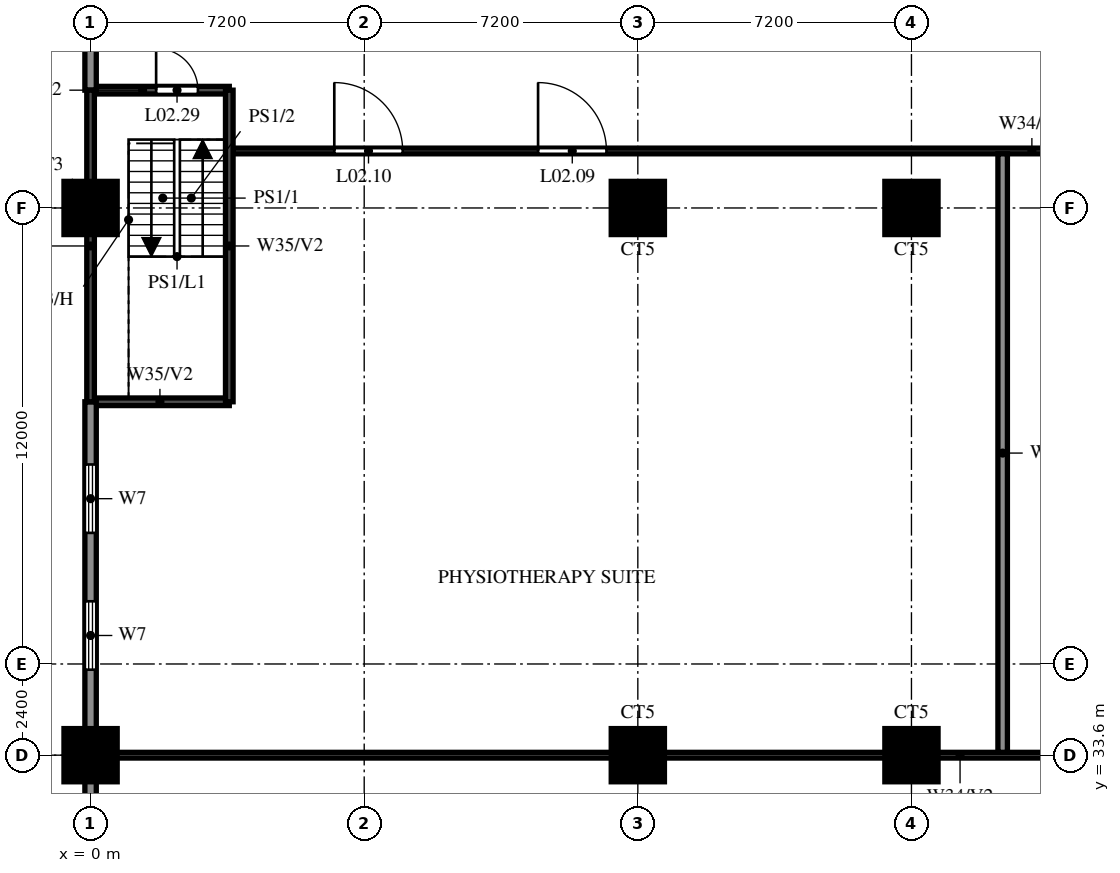
"""IFC4 building model, lengths in metres.
Left out: names, types, materials, properties, quantities, classifications, styles, units other than length and angle.
Written with IfcOpenShell. Run it as: python <this file> out.ifc"""

import sys

from ifc_helpers import new_model, si_unit, direction, frame, frame_2d, origin, origin_2d, place, context, subcontext, project, spatial, rectangle, circle, extrude, source, transform, mapped, element, fill, save


model = new_model("IFC4")
c1 = context("Model", 3, precision=1e-05, world=origin(), true_north=direction((0.0, 1.0)))
c2 = subcontext(c1, "Body", "Model", "MODEL_VIEW")
j1 = project(units=[si_unit("LENGTHUNIT", "METRE"), si_unit("PLANEANGLEUNIT", "RADIAN")], contexts=[c1])
p1 = place(None, origin())
s1 = spatial("IfcSite", under=j1, at=p1, CompositionType="ELEMENT")
p2 = place(p1, origin())
s2 = spatial("IfcBuilding", under=s1, at=p2, CompositionType="ELEMENT")
p3 = place(p2, frame((0.0, 0.0, 13.2)))
s3 = spatial("IfcBuildingStorey", under=s2, at=p3, CompositionType="ELEMENT", Elevation=13.2)
m1 = source(origin(), c2, "Body", "SweptSolid", [
    extrude(circle(Radius=0.7, at=origin_2d()), origin(), (0.0, 0.0, 1.0), 3.8),
])
for number, where, z_axis, x_axis in (
    (1, (0.0, 33.6, 0.0), (0.0, 0.0, 1.0), (1.0, 0.0, 0.0)),
    (2, (14.4, 33.6, 0.0), (0.0, 0.0, 1.0), (1.0, 0.0, 0.0)),
    (3, (21.6, 33.6, 0.0), (0.0, 0.0, 1.0), (1.0, 0.0, 0.0)),
    (4, (0.0, 48.0, 0.0), (0.0, 0.0, 1.0), (1.0, 0.0, 0.0)),
    (5, (14.4, 48.0, 0.0), (0.0, 0.0, 1.0), (1.0, 0.0, 0.0)),
    (6, (21.6, 48.0, 0.0), (0.0, 0.0, 1.0), (1.0, 0.0, 0.0)),
):
    element("IfcColumn", number, at=place(p3, frame(where, z_axis=z_axis, x_axis=x_axis)), inside=s3, PredefinedType="COLUMN", context=c2, shape_type="MappedRepresentation", body=[
        mapped(m1, transform((0.0, 0.0, 0.0))),
    ])
p4 = place(p3, frame((0.15, 33.6, 0.0), z_axis=(0.0, 0.0, 1.0), x_axis=(1.0, 0.0, 0.0)))
e7 = element("IfcWall", 7, at=p4, inside=s3, PredefinedType="PARTITIONING", context=c2, shape_type="SweptSolid", body=[
    extrude(rectangle(XDim=47.85, YDim=0.15, at=frame_2d((23.925, 0.0))), origin(), (0.0, 0.0, 1.0), 2.6),
])
p5 = place(p3, frame((0.0, 42.9, 0.0), z_axis=(0.0, 0.0, 1.0), x_axis=(1.0, 0.0, 0.0)))
e8 = element("IfcWall", 8, at=p5, inside=s3, PredefinedType="SOLIDWALL", context=c2, shape_type="SweptSolid", body=[
    extrude(rectangle(XDim=3.65, YDim=0.2, at=frame_2d((1.825, 0.0))), origin(), (0.0, 0.0, 1.0), 3.8),
])
p6 = place(p3, frame((3.75, 49.5, 0.0), z_axis=(0.0, 0.0, 1.0), x_axis=(1.0, 0.0, 0.0)))
e9 = element("IfcWall", 9, at=p6, inside=s3, PredefinedType="PARTITIONING", context=c2, shape_type="SweptSolid", body=[
    extrude(rectangle(XDim=44.25, YDim=0.15, at=frame_2d((22.125, 0.0))), origin(), (0.0, 0.0, 1.0), 2.6),
])
p7 = place(p6, frame((8.025, 0.0, 0.0)))
e10 = element("IfcOpeningElement", 10, at=p7, cuts=e9, PredefinedType="OPENING", context=c2, shape_type="SweptSolid", body=[
    extrude(rectangle(XDim=1.8, YDim=2.1, at=frame_2d((0.9, 1.05))), frame((0.0, 0.085, 0.0), z_axis=(0.0, -1.0, 0.0), x_axis=(1.0, 0.0, 0.0)), (0.0, 0.0, 1.0), 0.17),
])
p8 = place(p6, frame((2.663, 0.0, 0.0)))
e11 = element("IfcOpeningElement", 11, at=p8, cuts=e9, PredefinedType="OPENING", context=c2, shape_type="SweptSolid", body=[
    extrude(rectangle(XDim=1.8, YDim=2.1, at=frame_2d((0.9, 1.05))), frame((0.0, 0.085, 0.0), z_axis=(0.0, -1.0, 0.0), x_axis=(1.0, 0.0, 0.0)), (0.0, 0.0, 1.0), 0.17),
])
p9 = place(p6, frame((29.65, 0.0, 0.0)))
e12 = element("IfcOpeningElement", 12, at=p9, cuts=e9, PredefinedType="OPENING", context=c2, shape_type="SweptSolid", body=[
    extrude(rectangle(XDim=1.8, YDim=2.1, at=frame_2d((0.9, 1.05))), frame((0.0, 0.085, 0.0), z_axis=(0.0, -1.0, 0.0), x_axis=(1.0, 0.0, 0.0)), (0.0, 0.0, 1.0), 0.17),
])
p10 = place(p6, frame((22.42, 0.0, 0.0)))
e13 = element("IfcOpeningElement", 13, at=p10, cuts=e9, PredefinedType="OPENING", context=c2, shape_type="SweptSolid", body=[
    extrude(rectangle(XDim=1.8, YDim=2.1, at=frame_2d((0.9, 1.05))), frame((0.0, 0.085, 0.0), z_axis=(0.0, -1.0, 0.0), x_axis=(1.0, 0.0, 0.0)), (0.0, 0.0, 1.0), 0.17),
])
p11 = place(p3, frame((0.0, 51.1, 0.0), z_axis=(0.0, 0.0, 1.0), x_axis=(1.0, 0.0, 0.0)))
e14 = element("IfcWall", 14, at=p11, inside=s3, PredefinedType="SOLIDWALL", context=c2, shape_type="SweptSolid", body=[
    extrude(rectangle(XDim=3.65, YDim=0.2, at=frame_2d((1.825, 0.0))), origin(), (0.0, 0.0, 1.0), 3.8),
])
p12 = place(p11, frame((1.725, 0.0, 0.0)))
e15 = element("IfcOpeningElement", 15, at=p12, cuts=e14, PredefinedType="OPENING", context=c2, shape_type="SweptSolid", body=[
    extrude(rectangle(XDim=1.1, YDim=2.1, at=frame_2d((0.55, 1.05))), frame((0.0, 0.11, 0.0), z_axis=(0.0, -1.0, 0.0), x_axis=(1.0, 0.0, 0.0)), (0.0, 0.0, 1.0), 0.22),
])
p13 = place(p3, frame((0.0, 9.6, 0.0), z_axis=(0.0, 0.0, 1.0), x_axis=(0.0, 1.0, 0.0)))
e16 = element("IfcWall", 16, at=p13, inside=s3, PredefinedType="SOLIDWALL", context=c2, shape_type="SweptSolid", body=[
    extrude(rectangle(XDim=33.3, YDim=0.3, at=frame_2d((16.65, 0.0))), origin(), (0.0, 0.0, 1.0), 3.8),
])
p14 = place(p13, frame((1.05, 0.0, 0.6)))
e17 = element("IfcOpeningElement", 17, at=p14, cuts=e16, PredefinedType="OPENING", context=c2, shape_type="SweptSolid", body=[
    extrude(rectangle(XDim=1.8, YDim=2.4, at=frame_2d((0.9, 1.2))), frame((0.0, 0.16, 0.0), z_axis=(0.0, -1.0, 0.0), x_axis=(1.0, 0.0, 0.0)), (0.0, 0.0, 1.0), 0.32),
])
p15 = place(p13, frame((4.65, 0.0, 0.6)))
e18 = element("IfcOpeningElement", 18, at=p15, cuts=e16, PredefinedType="OPENING", context=c2, shape_type="SweptSolid", body=[
    extrude(rectangle(XDim=1.8, YDim=2.4, at=frame_2d((0.9, 1.2))), frame((0.0, 0.16, 0.0), z_axis=(0.0, -1.0, 0.0), x_axis=(1.0, 0.0, 0.0)), (0.0, 0.0, 1.0), 0.32),
])
p16 = place(p13, frame((11.85, 0.0, 0.6)))
e19 = element("IfcOpeningElement", 19, at=p16, cuts=e16, PredefinedType="OPENING", context=c2, shape_type="SweptSolid", body=[
    extrude(rectangle(XDim=1.8, YDim=2.4, at=frame_2d((0.9, 1.2))), frame((0.0, 0.16, 0.0), z_axis=(0.0, -1.0, 0.0), x_axis=(1.0, 0.0, 0.0)), (0.0, 0.0, 1.0), 0.32),
])
p17 = place(p13, frame((15.45, 0.0, 0.6)))
e20 = element("IfcOpeningElement", 20, at=p17, cuts=e16, PredefinedType="OPENING", context=c2, shape_type="SweptSolid", body=[
    extrude(rectangle(XDim=1.8, YDim=2.4, at=frame_2d((0.9, 1.2))), frame((0.0, 0.16, 0.0), z_axis=(0.0, -1.0, 0.0), x_axis=(1.0, 0.0, 0.0)), (0.0, 0.0, 1.0), 0.32),
])
p18 = place(p13, frame((26.25, 0.0, 0.6)))
e21 = element("IfcOpeningElement", 21, at=p18, cuts=e16, PredefinedType="OPENING", context=c2, shape_type="SweptSolid", body=[
    extrude(rectangle(XDim=1.8, YDim=2.4, at=frame_2d((0.9, 1.2))), frame((0.0, 0.16, 0.0), z_axis=(0.0, -1.0, 0.0), x_axis=(1.0, 0.0, 0.0)), (0.0, 0.0, 1.0), 0.32),
])
p19 = place(p13, frame((29.85, 0.0, 0.6)))
e22 = element("IfcOpeningElement", 22, at=p19, cuts=e16, PredefinedType="OPENING", context=c2, shape_type="SweptSolid", body=[
    extrude(rectangle(XDim=1.8, YDim=2.4, at=frame_2d((0.9, 1.2))), frame((0.0, 0.16, 0.0), z_axis=(0.0, -1.0, 0.0), x_axis=(1.0, 0.0, 0.0)), (0.0, 0.0, 1.0), 0.32),
])
p20 = place(p3, frame((0.0, 51.1, 0.0), z_axis=(0.0, 0.0, 1.0), x_axis=(0.0, 1.0, 0.0)))
e23 = element("IfcWall", 23, at=p20, inside=s3, PredefinedType="SOLIDWALL", context=c2, shape_type="SweptSolid", body=[
    extrude(rectangle(XDim=3.2, YDim=0.3, at=frame_2d((1.6, 0.0))), origin(), (0.0, 0.0, 1.0), 3.8),
])
for number, where, z_axis, x_axis in (
    (24, (0.0, 42.9, 0.0), (0.0, 0.0, 1.0), (0.0, 1.0, 0.0)),
    (25, (3.65, 42.9, 0.0), (0.0, 0.0, 1.0), (0.0, 1.0, 0.0)),
):
    element("IfcWall", number, at=place(p3, frame(where, z_axis=z_axis, x_axis=x_axis)), inside=s3, PredefinedType="SOLIDWALL", context=c2, shape_type="SweptSolid", body=[
        extrude(rectangle(XDim=8.2, YDim=0.2, at=frame_2d((4.1, 0.0))), origin(), (0.0, 0.0, 1.0), 3.8),
    ])
p21 = place(p3, frame((24.0, 33.675, 0.0), z_axis=(0.0, 0.0, 1.0), x_axis=(0.0, 1.0, 0.0)))
e26 = element("IfcWall", 26, at=p21, inside=s3, PredefinedType="SOLIDWALL", context=c2, shape_type="SweptSolid", body=[
    extrude(rectangle(XDim=15.75, YDim=0.25, at=frame_2d((7.875, 0.0))), origin(), (0.0, 0.0, 1.0), 2.9),
])
p22 = place(p7, origin())
e27 = element("IfcDoor", 27, at=p22, inside=s3, OperationType="DOUBLE_DOOR_SINGLE_SWING", PredefinedType="DOOR", context=c2, shape_type="SweptSolid", body=[
    extrude(rectangle(XDim=1.8, YDim=2.1, at=frame_2d((0.9, 1.05))), frame((0.0, 0.025, 0.0), z_axis=(0.0, -1.0, 0.0), x_axis=(1.0, 0.0, 0.0)), (0.0, 0.0, 1.0), 0.05),
])
fill(e10, e27)
p23 = place(p8, origin())
e28 = element("IfcDoor", 28, at=p23, inside=s3, OperationType="DOUBLE_DOOR_SINGLE_SWING", PredefinedType="DOOR", context=c2, shape_type="SweptSolid", body=[
    extrude(rectangle(XDim=1.8, YDim=2.1, at=frame_2d((0.9, 1.05))), frame((0.0, 0.025, 0.0), z_axis=(0.0, -1.0, 0.0), x_axis=(1.0, 0.0, 0.0)), (0.0, 0.0, 1.0), 0.05),
])
fill(e11, e28)
p24 = place(p12, origin())
e29 = element("IfcDoor", 29, at=p24, inside=s3, OperationType="SINGLE_SWING_RIGHT", PredefinedType="DOOR", context=c2, shape_type="SweptSolid", body=[
    extrude(rectangle(XDim=1.1, YDim=2.1, at=frame_2d((0.55, 1.05))), frame((0.0, 0.025, 0.0), z_axis=(0.0, -1.0, 0.0), x_axis=(1.0, 0.0, 0.0)), (0.0, 0.0, 1.0), 0.05),
])
fill(e15, e29)
p25 = place(p18, origin())
e30 = element("IfcWindow", 30, at=p25, inside=s3, PartitioningType="DOUBLE_PANEL_VERTICAL", PredefinedType="WINDOW", context=c2, shape_type="SweptSolid", body=[
    extrude(rectangle(XDim=1.8, YDim=2.4, at=frame_2d((0.9, 1.2))), frame((0.0, 0.03, 0.0), z_axis=(0.0, -1.0, 0.0), x_axis=(1.0, 0.0, 0.0)), (0.0, 0.0, 1.0), 0.06),
])
fill(e21, e30)
p26 = place(p19, origin())
e31 = element("IfcWindow", 31, at=p26, inside=s3, PartitioningType="DOUBLE_PANEL_VERTICAL", PredefinedType="WINDOW", context=c2, shape_type="SweptSolid", body=[
    extrude(rectangle(XDim=1.8, YDim=2.4, at=frame_2d((0.9, 1.2))), frame((0.0, 0.03, 0.0), z_axis=(0.0, -1.0, 0.0), x_axis=(1.0, 0.0, 0.0)), (0.0, 0.0, 1.0), 0.06),
])
fill(e22, e31)
save(model, sys.argv[1])
